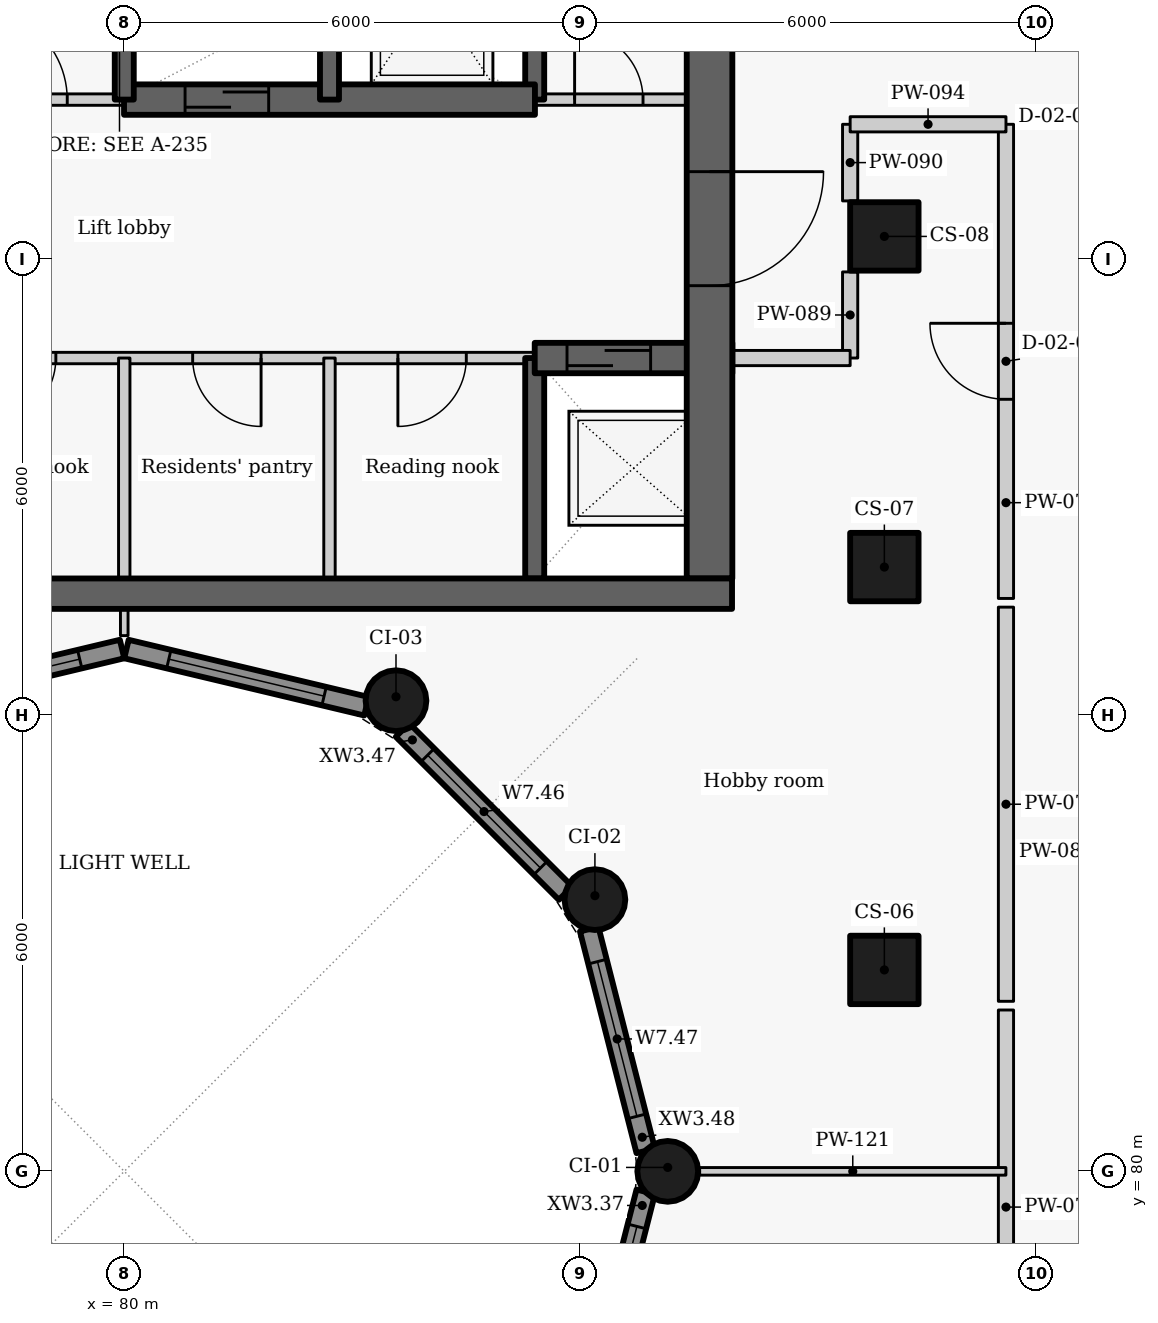
"""IFC4 building model, lengths in metres.
Left out: names, types, materials, properties, quantities, classifications, styles, units other than length and angle.
Written with IfcOpenShell. Run it as: python <this file> out.ifc"""

import sys

from ifc_helpers import new_model, si_unit, direction, frame, frame_2d, origin, origin_2d, place, context, subcontext, project, spatial, rectangle, circle, extrude, element, fill, save


model = new_model("IFC4")
c1 = context("Model", 3, precision=1e-05, world=origin(), true_north=direction((0.0, 1.0)))
c2 = subcontext(c1, "Body", "Model", "MODEL_VIEW")
j1 = project(units=[si_unit("LENGTHUNIT", "METRE"), si_unit("PLANEANGLEUNIT", "RADIAN")], contexts=[c1])
p1 = place(None, origin())
s1 = spatial("IfcSite", under=j1, at=p1, CompositionType="ELEMENT")
p2 = place(p1, origin())
s2 = spatial("IfcBuilding", under=s1, at=p2, CompositionType="ELEMENT")
p3 = place(p2, frame((0.0, 0.0, 203.1)))
s3 = spatial("IfcBuildingStorey", under=s2, at=p3, CompositionType="ELEMENT", Elevation=203.1)
for number, where, z_axis, x_axis in (
    (1, (90.0, 82.65, 0.0), (0.0, 0.0, 1.0), (0.0, 1.0, 0.0)),
    (2, (90.0, 87.95, 0.0), (0.0, 0.0, 1.0), (0.0, 1.0, 0.0)),
    (3, (90.0, 92.3, 0.0), (0.0, 0.0, 1.0), (0.0, 1.0, 0.0)),
):
    element("IfcColumn", number, at=place(p3, frame(where, z_axis=z_axis, x_axis=x_axis)), inside=s3, PredefinedType="COLUMN", context=c2, shape_type="SweptSolid", body=[
        extrude(rectangle(XDim=0.9, YDim=0.9, at=origin_2d()), origin(), (0.0, 0.0, 1.0), 3.3),
    ])
for number, where, z_axis, x_axis in (
    (4, (87.15, 80.0, 0.0), (0.0, 0.0, 1.0), (0.0, 1.0, 0.0)),
    (5, (86.192, 83.575, 0.0), (0.0, 0.0, 1.0), (-0.5, 0.866, 0.0)),
    (6, (83.575, 86.192, 0.0), (0.0, 0.0, 1.0), (-0.866, 0.5, 0.0)),
):
    element("IfcColumn", number, at=place(p3, frame(where, z_axis=z_axis, x_axis=x_axis)), inside=s3, PredefinedType="COLUMN", context=c2, shape_type="SweptSolid", body=[
        extrude(circle(Radius=0.4, at=origin_2d()), origin(), (0.0, 0.0, 1.0), 3.3),
    ])
p4 = place(p3, frame((86.86, 79.73, 0.0), z_axis=(0.0, 0.0, 1.0), x_axis=(-0.247055971283, -0.969001211069, 0.0)))
e7 = element("IfcWall", 7, at=p4, inside=s3, PredefinedType="SOLIDWALL", context=c2, shape_type="SweptSolid", body=[
    extrude(rectangle(XDim=3.01, YDim=0.25, at=frame_2d((1.505, 0.0))), origin(), (0.0, 0.0, 1.0), 2.425),
])
p5 = place(p4, frame((0.469, 0.0, 0.9)))
e8 = element("IfcOpeningElement", 8, at=p5, cuts=e7, PredefinedType="OPENING", context=c2, shape_type="SweptSolid", body=[
    extrude(rectangle(XDim=2.1, YDim=1.1, at=frame_2d((1.05, 0.55))), frame((0.0, 0.135, 0.0), z_axis=(0.0, -1.0, 0.0), x_axis=(1.0, 0.0, 0.0)), (0.0, 0.0, 1.0), 0.27),
])
p6 = place(p3, frame((76.814, 86.119, 0.0), z_axis=(0.0, 0.0, 1.0), x_axis=(0.972773113459, 0.231759508395, 0.0)))
e9 = element("IfcWall", 9, at=p6, inside=s3, PredefinedType="SOLIDWALL", context=c2, shape_type="SweptSolid", body=[
    extrude(rectangle(XDim=3.246, YDim=0.25, at=frame_2d((1.623, 0.0))), origin(), (0.0, 0.0, 1.0), 2.425),
])
p7 = place(p6, frame((0.573, 0.0, 0.9)))
e10 = element("IfcOpeningElement", 10, at=p7, cuts=e9, PredefinedType="OPENING", context=c2, shape_type="SweptSolid", body=[
    extrude(rectangle(XDim=2.1, YDim=1.1, at=frame_2d((1.05, 0.55))), frame((0.0, 0.135, 0.0), z_axis=(0.0, -1.0, 0.0), x_axis=(1.0, 0.0, 0.0)), (0.0, 0.0, 1.0), 0.27),
])
p8 = place(p3, frame((80.029, 86.872, 0.0), z_axis=(0.0, 0.0, 1.0), x_axis=(0.972773113459, -0.231759508395, 0.0)))
e11 = element("IfcWall", 11, at=p8, inside=s3, PredefinedType="SOLIDWALL", context=c2, shape_type="SweptSolid", body=[
    extrude(rectangle(XDim=3.246, YDim=0.25, at=frame_2d((1.623, 0.0))), origin(), (0.0, 0.0, 1.0), 2.425),
])
p9 = place(p8, frame((0.573, 0.0, 0.9)))
e12 = element("IfcOpeningElement", 12, at=p9, cuts=e11, PredefinedType="OPENING", context=c2, shape_type="SweptSolid", body=[
    extrude(rectangle(XDim=2.1, YDim=1.1, at=frame_2d((1.05, 0.55))), frame((0.0, 0.135, 0.0), z_axis=(0.0, -1.0, 0.0), x_axis=(1.0, 0.0, 0.0)), (0.0, 0.0, 1.0), 0.27),
])
p10 = place(p3, frame((83.661, 85.806, 0.0), z_axis=(0.0, 0.0, 1.0), x_axis=(0.707106781187, -0.707106781187, 0.0)))
e13 = element("IfcWall", 13, at=p10, inside=s3, PredefinedType="SOLIDWALL", context=c2, shape_type="SweptSolid", body=[
    extrude(rectangle(XDim=3.033, YDim=0.25, at=frame_2d((1.517, 0.0))), origin(), (0.0, 0.0, 1.0), 2.425),
])
p11 = place(p10, frame((0.467, 0.0, 0.9)))
e14 = element("IfcOpeningElement", 14, at=p11, cuts=e13, PredefinedType="OPENING", context=c2, shape_type="SweptSolid", body=[
    extrude(rectangle(XDim=2.1, YDim=1.1, at=frame_2d((1.05, 0.55))), frame((0.0, 0.135, 0.0), z_axis=(0.0, -1.0, 0.0), x_axis=(1.0, 0.0, 0.0)), (0.0, 0.0, 1.0), 0.27),
])
p12 = place(p3, frame((86.117, 83.187, 0.0), z_axis=(0.0, 0.0, 1.0), x_axis=(0.247055971283, -0.969001211069, 0.0)))
e15 = element("IfcWall", 15, at=p12, inside=s3, PredefinedType="SOLIDWALL", context=c2, shape_type="SweptSolid", body=[
    extrude(rectangle(XDim=3.01, YDim=0.25, at=frame_2d((1.505, 0.0))), origin(), (0.0, 0.0, 1.0), 2.425),
])
p13 = place(p12, frame((0.441, 0.0, 0.9)))
e16 = element("IfcOpeningElement", 16, at=p13, cuts=e15, PredefinedType="OPENING", context=c2, shape_type="SweptSolid", body=[
    extrude(rectangle(XDim=2.1, YDim=1.1, at=frame_2d((1.05, 0.55))), frame((0.0, 0.135, 0.0), z_axis=(0.0, -1.0, 0.0), x_axis=(1.0, 0.0, 0.0)), (0.0, 0.0, 1.0), 0.27),
])
p14 = place(p3, frame((85.4, 90.7, 0.0), z_axis=(0.0, 0.0, 1.0), x_axis=(-1.0, 0.0, 0.0)))
e17 = element("IfcWall", 17, at=p14, inside=s3, PredefinedType="PARTITIONING", context=c2, shape_type="SweptSolid", body=[
    extrude(rectangle(XDim=13.4, YDim=0.15, at=frame_2d((6.7, 0.0))), origin(), (0.0, 0.0, 1.0), 3.025),
])
p15 = place(p14, frame((11.325, 0.0, 0.0)))
e18 = element("IfcOpeningElement", 18, at=p15, cuts=e17, PredefinedType="OPENING", context=c2, shape_type="SweptSolid", body=[
    extrude(rectangle(XDim=0.9, YDim=2.1, at=frame_2d((0.45, 1.05))), frame((0.0, 0.085, 0.0), z_axis=(0.0, -1.0, 0.0), x_axis=(1.0, 0.0, 0.0)), (0.0, 0.0, 1.0), 0.17),
])
p16 = place(p14, frame((9.0, 0.0, 0.0)))
e19 = element("IfcOpeningElement", 19, at=p16, cuts=e17, PredefinedType="OPENING", context=c2, shape_type="SweptSolid", body=[
    extrude(rectangle(XDim=0.9, YDim=2.1, at=frame_2d((0.45, 1.05))), frame((0.0, 0.085, 0.0), z_axis=(0.0, -1.0, 0.0), x_axis=(1.0, 0.0, 0.0)), (0.0, 0.0, 1.0), 0.17),
])
p17 = place(p14, frame((6.3, 0.0, 0.0)))
e20 = element("IfcOpeningElement", 20, at=p17, cuts=e17, PredefinedType="OPENING", context=c2, shape_type="SweptSolid", body=[
    extrude(rectangle(XDim=0.9, YDim=2.1, at=frame_2d((0.45, 1.05))), frame((0.0, 0.085, 0.0), z_axis=(0.0, -1.0, 0.0), x_axis=(1.0, 0.0, 0.0)), (0.0, 0.0, 1.0), 0.17),
])
p18 = place(p14, frame((3.6, 0.0, 0.0)))
e21 = element("IfcOpeningElement", 21, at=p18, cuts=e17, PredefinedType="OPENING", context=c2, shape_type="SweptSolid", body=[
    extrude(rectangle(XDim=0.9, YDim=2.1, at=frame_2d((0.45, 1.05))), frame((0.0, 0.085, 0.0), z_axis=(0.0, -1.0, 0.0), x_axis=(1.0, 0.0, 0.0)), (0.0, 0.0, 1.0), 0.17),
])
p19 = place(p14, frame((0.9, 0.0, 0.0)))
e22 = element("IfcOpeningElement", 22, at=p19, cuts=e17, PredefinedType="OPENING", context=c2, shape_type="SweptSolid", body=[
    extrude(rectangle(XDim=0.9, YDim=2.1, at=frame_2d((0.45, 1.05))), frame((0.0, 0.085, 0.0), z_axis=(0.0, -1.0, 0.0), x_axis=(1.0, 0.0, 0.0)), (0.0, 0.0, 1.0), 0.17),
])
p20 = place(p3, frame((85.4, 87.8, -0.275), z_axis=(0.0, 0.0, 1.0), x_axis=(0.0, 1.0, 0.0)))
e23 = element("IfcWall", 23, at=p20, inside=s3, PredefinedType="SHEAR", context=c2, shape_type="SweptSolid", body=[
    extrude(rectangle(XDim=2.9, YDim=0.25, at=frame_2d((1.45, 0.0))), origin(), (0.0, 0.0, 1.0), 3.3),
])
p21 = place(p3, frame((85.4, 94.1, -0.275), z_axis=(0.0, 0.0, 1.0), x_axis=(0.0, 1.0, 0.0)))
e24 = element("IfcWall", 24, at=p21, inside=s3, PredefinedType="SHEAR", context=c2, shape_type="SweptSolid", body=[
    extrude(rectangle(XDim=2.8, YDim=0.25, at=frame_2d((1.4, 0.0))), origin(), (0.0, 0.0, 1.0), 3.3),
])
p22 = place(p3, frame((85.4, 90.7, -0.275), z_axis=(0.0, 0.0, 1.0), x_axis=(1.0, 0.0, 0.0)))
e25 = element("IfcWall", 25, at=p22, inside=s3, PredefinedType="SHEAR", context=c2, shape_type="SweptSolid", body=[
    extrude(rectangle(XDim=2.6, YDim=0.4, at=frame_2d((1.3, 0.0))), origin(), (0.0, 0.0, 1.0), 3.3),
])
p23 = place(p22, frame((0.425, 0.0, 0.275)))
e26 = element("IfcOpeningElement", 26, at=p23, cuts=e25, PredefinedType="OPENING", context=c2, shape_type="SweptSolid", body=[
    extrude(rectangle(XDim=1.1, YDim=2.1, at=frame_2d((0.55, 1.05))), frame((0.0, 0.21, 0.0), z_axis=(0.0, -1.0, 0.0), x_axis=(1.0, 0.0, 0.0)), (0.0, 0.0, 1.0), 0.42),
])
p24 = place(p3, frame((87.7, 102.05, -0.275), z_axis=(0.0, 0.0, 1.0), x_axis=(0.0, -1.0, 0.0)))
e27 = element("IfcWall", 27, at=p24, inside=s3, PredefinedType="SHEAR", context=c2, shape_type="SweptSolid", body=[
    extrude(rectangle(XDim=14.25, YDim=0.6, at=frame_2d((7.125, 0.0))), origin(), (0.0, 0.0, 1.0), 3.3),
])
p25 = place(p24, frame((8.898, 0.0, 0.275)))
e28 = element("IfcOpeningElement", 28, at=p25, cuts=e27, PredefinedType="OPENING", context=c2, shape_type="SweptSolid", body=[
    extrude(rectangle(XDim=1.5, YDim=2.1, at=frame_2d((0.75, 1.05))), frame((0.0, 0.31, 0.0), z_axis=(0.0, -1.0, 0.0), x_axis=(1.0, 0.0, 0.0)), (0.0, 0.0, 1.0), 0.62),
])
for number, where, z_axis, x_axis in (
    (29, (80.0, 87.8, 0.0), (0.0, 0.0, 1.0), (0.0, 1.0, 0.0)),
    (30, (82.7, 87.8, 0.0), (0.0, 0.0, 1.0), (0.0, 1.0, 0.0)),
):
    element("IfcWall", number, at=place(p3, frame(where, z_axis=z_axis, x_axis=x_axis)), inside=s3, PredefinedType="PARTITIONING", context=c2, shape_type="SweptSolid", body=[
        extrude(rectangle(XDim=2.9, YDim=0.15, at=frame_2d((1.45, 0.0))), origin(), (0.0, 0.0, 1.0), 3.025),
    ])
p26 = place(p3, frame((77.297, 94.1, 0.0), z_axis=(0.0, 0.0, 1.0), x_axis=(1.0, 0.0, 0.0)))
e31 = element("IfcWall", 31, at=p26, inside=s3, PredefinedType="PARTITIONING", context=c2, shape_type="SweptSolid", body=[
    extrude(rectangle(XDim=2.706, YDim=0.15, at=frame_2d((1.353, 0.0))), origin(), (0.0, 0.0, 1.0), 3.025),
])
p27 = place(p26, frame((0.753, 0.0, 0.0)))
e32 = element("IfcOpeningElement", 32, at=p27, cuts=e31, PredefinedType="OPENING", context=c2, shape_type="SweptSolid", body=[
    extrude(rectangle(XDim=1.2, YDim=2.1, at=frame_2d((0.6, 1.05))), frame((0.0, 0.085, 0.0), z_axis=(0.0, -1.0, 0.0), x_axis=(1.0, 0.0, 0.0)), (0.0, 0.0, 1.0), 0.17),
])
p28 = place(p3, frame((85.397, 94.1, 0.0), z_axis=(0.0, 0.0, 1.0), x_axis=(1.0, 0.0, 0.0)))
e33 = element("IfcWall", 33, at=p28, inside=s3, PredefinedType="PARTITIONING", context=c2, shape_type="SweptSolid", body=[
    extrude(rectangle(XDim=2.603, YDim=0.15, at=frame_2d((1.302, 0.0))), origin(), (0.0, 0.0, 1.0), 3.025),
])
p29 = place(p28, frame((0.528, 0.0, 0.0)))
e34 = element("IfcOpeningElement", 34, at=p29, cuts=e33, PredefinedType="OPENING", context=c2, shape_type="SweptSolid", body=[
    extrude(rectangle(XDim=0.9, YDim=2.1, at=frame_2d((0.45, 1.05))), frame((0.0, 0.085, 0.0), z_axis=(0.0, -1.0, 0.0), x_axis=(1.0, 0.0, 0.0)), (0.0, 0.0, 1.0), 0.17),
])
p30 = place(p3, frame((79.997, 94.1, -0.275), z_axis=(0.0, 0.0, 1.0), x_axis=(1.0, 0.0, 0.0)))
e35 = element("IfcWall", 35, at=p30, inside=s3, PredefinedType="SHEAR", context=c2, shape_type="SweptSolid", body=[
    extrude(rectangle(XDim=5.406, YDim=0.4, at=frame_2d((2.703, 0.0))), origin(), (0.0, 0.0, 1.0), 3.3),
])
p31 = place(p30, frame((0.803, 0.0, 0.275)))
e36 = element("IfcOpeningElement", 36, at=p31, cuts=e35, PredefinedType="OPENING", context=c2, shape_type="SweptSolid", body=[
    extrude(rectangle(XDim=1.1, YDim=2.1, at=frame_2d((0.55, 1.05))), frame((0.0, 0.21, 0.0), z_axis=(0.0, -1.0, 0.0), x_axis=(1.0, 0.0, 0.0)), (0.0, 0.0, 1.0), 0.42),
])
for number, where, z_axis, x_axis in (
    (37, (80.0, 94.1, -0.275), (0.0, 0.0, 1.0), (0.0, 1.0, 0.0)),
    (38, (82.7, 94.1, -0.275), (0.0, 0.0, 1.0), (0.0, 1.0, 0.0)),
):
    element("IfcWall", number, at=place(p3, frame(where, z_axis=z_axis, x_axis=x_axis)), inside=s3, PredefinedType="SHEAR", context=c2, shape_type="SweptSolid", body=[
        extrude(rectangle(XDim=2.8, YDim=0.25, at=frame_2d((1.4, 0.0))), origin(), (0.0, 0.0, 1.0), 3.3),
    ])
for number, where, z_axis, x_axis in (
    (39, (91.6, 76.937, 0.0), (0.0, 0.0, 1.0), (0.0, 1.0, 0.0)),
    (40, (91.6, 82.237, 0.0), (0.0, 0.0, 1.0), (0.0, 1.0, 0.0)),
):
    element("IfcWall", number, at=place(p3, frame(where, z_axis=z_axis, x_axis=x_axis)), inside=s3, PredefinedType="PARTITIONING", context=c2, shape_type="SweptSolid", body=[
        extrude(rectangle(XDim=5.186, YDim=0.2, at=frame_2d((2.593, 0.0))), origin(), (0.0, 0.0, 1.0), 3.025),
    ])
p32 = place(p3, frame((91.6, 87.537, 0.0), z_axis=(0.0, 0.0, 1.0), x_axis=(0.0, 1.0, 0.0)))
e41 = element("IfcWall", 41, at=p32, inside=s3, PredefinedType="PARTITIONING", context=c2, shape_type="SweptSolid", body=[
    extrude(rectangle(XDim=6.238, YDim=0.2, at=frame_2d((3.119, 0.0))), origin(), (0.0, 0.0, 1.0), 3.025),
])
p33 = place(p32, frame((2.62, 0.0, 0.0)))
e42 = element("IfcOpeningElement", 42, at=p33, cuts=e41, PredefinedType="OPENING", context=c2, shape_type="SweptSolid", body=[
    extrude(rectangle(XDim=1.0, YDim=2.1, at=frame_2d((0.5, 1.05))), frame((0.0, 0.11, 0.0), z_axis=(0.0, -1.0, 0.0), x_axis=(1.0, 0.0, 0.0)), (0.0, 0.0, 1.0), 0.22),
])
p34 = place(p3, frame((89.55, 90.7, 0.0), z_axis=(0.0, 0.0, 1.0), x_axis=(0.0, 1.0, 0.0)))
e43 = element("IfcWall", 43, at=p34, inside=s3, PredefinedType="PARTITIONING", context=c2, shape_type="SweptSolid", body=[
    extrude(rectangle(XDim=1.133, YDim=0.2, at=frame_2d((0.566, 0.0))), origin(), (0.0, 0.0, 1.0), 3.025),
])
p35 = place(p3, frame((89.55, 92.767, 0.0), z_axis=(0.0, 0.0, 1.0), x_axis=(0.0, 1.0, 0.0)))
e44 = element("IfcWall", 44, at=p35, inside=s3, PredefinedType="PARTITIONING", context=c2, shape_type="SweptSolid", body=[
    extrude(rectangle(XDim=1.008, YDim=0.2, at=frame_2d((0.504, 0.0))), origin(), (0.0, 0.0, 1.0), 3.025),
])
p36 = place(p3, frame((89.55, 93.775, 0.0), z_axis=(0.0, 0.0, 1.0), x_axis=(1.0, 0.0, 0.0)))
e45 = element("IfcWall", 45, at=p36, inside=s3, PredefinedType="PARTITIONING", context=c2, shape_type="SweptSolid", body=[
    extrude(rectangle(XDim=2.05, YDim=0.2, at=frame_2d((1.025, 0.0))), origin(), (0.0, 0.0, 1.0), 2.505),
])
p37 = place(p3, frame((88.0, 90.7, 0.0), z_axis=(0.0, 0.0, 1.0), x_axis=(1.0, 0.0, 0.0)))
e46 = element("IfcWall", 46, at=p37, inside=s3, PredefinedType="PARTITIONING", context=c2, shape_type="SweptSolid", body=[
    extrude(rectangle(XDim=1.55, YDim=0.2, at=frame_2d((0.775, 0.0))), origin(), (0.0, 0.0, 1.0), 3.025),
])
p38 = place(p3, frame((80.0, 87.048, 0.0), z_axis=(0.0, 0.0, 1.0), x_axis=(0.0, 1.0, 0.0)))
e47 = element("IfcWall", 47, at=p38, inside=s3, PredefinedType="PARTITIONING", context=c2, shape_type="SweptSolid", body=[
    extrude(rectangle(XDim=0.352, YDim=0.1, at=frame_2d((0.176, 0.0))), origin(), (0.0, 0.0, 1.0), 3.025),
])
p39 = place(p3, frame((87.57, 80.0, 0.0), z_axis=(0.0, 0.0, 1.0), x_axis=(1.0, 0.0, 0.0)))
e48 = element("IfcWall", 48, at=p39, inside=s3, PredefinedType="PARTITIONING", context=c2, shape_type="SweptSolid", body=[
    extrude(rectangle(XDim=4.029, YDim=0.1, at=frame_2d((2.015, 0.0))), origin(), (0.0, 0.0, 1.0), 2.505),
])
p40 = place(p3, frame((72.004, 87.6, -0.275), z_axis=(0.0, 0.0, 1.0), x_axis=(1.0, 0.0, 0.0)))
e49 = element("IfcWall", 49, at=p40, inside=s3, PredefinedType="SHEAR", context=c2, shape_type="SweptSolid", body=[
    extrude(rectangle(XDim=15.992, YDim=0.4, at=frame_2d((7.996, 0.0))), origin(), (0.0, 0.0, 1.0), 3.3),
])
p41 = place(p5, origin())
e50 = element("IfcWindow", 50, at=p41, inside=s3, PartitioningType="SINGLE_PANEL", PredefinedType="WINDOW", context=c2, shape_type="SweptSolid", body=[
    extrude(rectangle(XDim=2.1, YDim=1.1, at=frame_2d((1.05, 0.55))), frame((0.0, 0.03, 0.0), z_axis=(0.0, -1.0, 0.0), x_axis=(1.0, 0.0, 0.0)), (0.0, 0.0, 1.0), 0.06),
])
fill(e8, e50)
p42 = place(p7, origin())
e51 = element("IfcWindow", 51, at=p42, inside=s3, PartitioningType="SINGLE_PANEL", PredefinedType="WINDOW", context=c2, shape_type="SweptSolid", body=[
    extrude(rectangle(XDim=2.1, YDim=1.1, at=frame_2d((1.05, 0.55))), frame((0.0, 0.03, 0.0), z_axis=(0.0, -1.0, 0.0), x_axis=(1.0, 0.0, 0.0)), (0.0, 0.0, 1.0), 0.06),
])
fill(e10, e51)
p43 = place(p9, origin())
e52 = element("IfcWindow", 52, at=p43, inside=s3, PartitioningType="SINGLE_PANEL", PredefinedType="WINDOW", context=c2, shape_type="SweptSolid", body=[
    extrude(rectangle(XDim=2.1, YDim=1.1, at=frame_2d((1.05, 0.55))), frame((0.0, 0.03, 0.0), z_axis=(0.0, -1.0, 0.0), x_axis=(1.0, 0.0, 0.0)), (0.0, 0.0, 1.0), 0.06),
])
fill(e12, e52)
p44 = place(p11, origin())
e53 = element("IfcWindow", 53, at=p44, inside=s3, PartitioningType="SINGLE_PANEL", PredefinedType="WINDOW", context=c2, shape_type="SweptSolid", body=[
    extrude(rectangle(XDim=2.1, YDim=1.1, at=frame_2d((1.05, 0.55))), frame((0.0, 0.03, 0.0), z_axis=(0.0, -1.0, 0.0), x_axis=(1.0, 0.0, 0.0)), (0.0, 0.0, 1.0), 0.06),
])
fill(e14, e53)
p45 = place(p13, origin())
e54 = element("IfcWindow", 54, at=p45, inside=s3, PartitioningType="SINGLE_PANEL", PredefinedType="WINDOW", context=c2, shape_type="SweptSolid", body=[
    extrude(rectangle(XDim=2.1, YDim=1.1, at=frame_2d((1.05, 0.55))), frame((0.0, 0.03, 0.0), z_axis=(0.0, -1.0, 0.0), x_axis=(1.0, 0.0, 0.0)), (0.0, 0.0, 1.0), 0.06),
])
fill(e16, e54)
p46 = place(p23, origin())
e55 = element("IfcDoor", 55, at=p46, inside=s3, OperationType="SLIDING_TO_LEFT", PredefinedType="DOOR", context=c2, shape_type="SweptSolid", body=[
    extrude(rectangle(XDim=1.1, YDim=2.1, at=frame_2d((0.55, 1.05))), frame((0.0, 0.025, 0.0), z_axis=(0.0, -1.0, 0.0), x_axis=(1.0, 0.0, 0.0)), (0.0, 0.0, 1.0), 0.05),
])
fill(e26, e55)
p47 = place(p17, origin())
e56 = element("IfcDoor", 56, at=p47, inside=s3, OperationType="SINGLE_SWING_RIGHT", PredefinedType="DOOR", context=c2, shape_type="SweptSolid", body=[
    extrude(rectangle(XDim=0.9, YDim=2.1, at=frame_2d((0.45, 1.05))), frame((0.0, 0.025, 0.0), z_axis=(0.0, -1.0, 0.0), x_axis=(1.0, 0.0, 0.0)), (0.0, 0.0, 1.0), 0.05),
])
fill(e20, e56)
p48 = place(p18, origin())
e57 = element("IfcDoor", 57, at=p48, inside=s3, OperationType="SINGLE_SWING_LEFT", PredefinedType="DOOR", context=c2, shape_type="SweptSolid", body=[
    extrude(rectangle(XDim=0.9, YDim=2.1, at=frame_2d((0.45, 1.05))), frame((0.0, 0.025, 0.0), z_axis=(0.0, -1.0, 0.0), x_axis=(1.0, 0.0, 0.0)), (0.0, 0.0, 1.0), 0.05),
])
fill(e21, e57)
p49 = place(p19, origin())
e58 = element("IfcDoor", 58, at=p49, inside=s3, OperationType="SINGLE_SWING_RIGHT", PredefinedType="DOOR", context=c2, shape_type="SweptSolid", body=[
    extrude(rectangle(XDim=0.9, YDim=2.1, at=frame_2d((0.45, 1.05))), frame((0.0, 0.025, 0.0), z_axis=(0.0, -1.0, 0.0), x_axis=(1.0, 0.0, 0.0)), (0.0, 0.0, 1.0), 0.05),
])
fill(e22, e58)
p50 = place(p27, origin())
e59 = element("IfcDoor", 59, at=p50, inside=s3, OperationType="DOUBLE_DOOR_SINGLE_SWING", PredefinedType="DOOR", context=c2, shape_type="SweptSolid", body=[
    extrude(rectangle(XDim=1.2, YDim=2.1, at=frame_2d((0.6, 1.05))), frame((0.0, 0.025, 0.0), z_axis=(0.0, -1.0, 0.0), x_axis=(1.0, 0.0, 0.0)), (0.0, 0.0, 1.0), 0.05),
])
fill(e32, e59)
p51 = place(p31, origin())
e60 = element("IfcDoor", 60, at=p51, inside=s3, OperationType="SLIDING_TO_LEFT", PredefinedType="DOOR", context=c2, shape_type="SweptSolid", body=[
    extrude(rectangle(XDim=1.1, YDim=2.1, at=frame_2d((0.55, 1.05))), frame((0.0, 0.025, 0.0), z_axis=(0.0, -1.0, 0.0), x_axis=(1.0, 0.0, 0.0)), (0.0, 0.0, 1.0), 0.05),
])
fill(e36, e60)
p52 = place(p29, origin())
e61 = element("IfcDoor", 61, at=p52, inside=s3, OperationType="SINGLE_SWING_LEFT", PredefinedType="DOOR", context=c2, shape_type="SweptSolid", body=[
    extrude(rectangle(XDim=0.9, YDim=2.1, at=frame_2d((0.45, 1.05))), frame((0.0, 0.025, 0.0), z_axis=(0.0, -1.0, 0.0), x_axis=(1.0, 0.0, 0.0)), (0.0, 0.0, 1.0), 0.05),
])
fill(e34, e61)
p53 = place(p33, origin())
e62 = element("IfcDoor", 62, at=p53, inside=s3, OperationType="SINGLE_SWING_RIGHT", PredefinedType="DOOR", context=c2, shape_type="SweptSolid", body=[
    extrude(rectangle(XDim=1.0, YDim=2.1, at=frame_2d((0.5, 1.05))), frame((0.0, 0.025, 0.0), z_axis=(0.0, -1.0, 0.0), x_axis=(1.0, 0.0, 0.0)), (0.0, 0.0, 1.0), 0.05),
])
fill(e42, e62)
p54 = place(p25, origin())
e63 = element("IfcDoor", 63, at=p54, inside=s3, OperationType="DOUBLE_DOOR_SINGLE_SWING", PredefinedType="DOOR", context=c2, shape_type="SweptSolid", body=[
    extrude(rectangle(XDim=1.5, YDim=2.1, at=frame_2d((0.75, 1.05))), frame((0.0, 0.025, 0.0), z_axis=(0.0, -1.0, 0.0), x_axis=(1.0, 0.0, 0.0)), (0.0, 0.0, 1.0), 0.05),
])
fill(e28, e63)
save(model, sys.argv[1])
